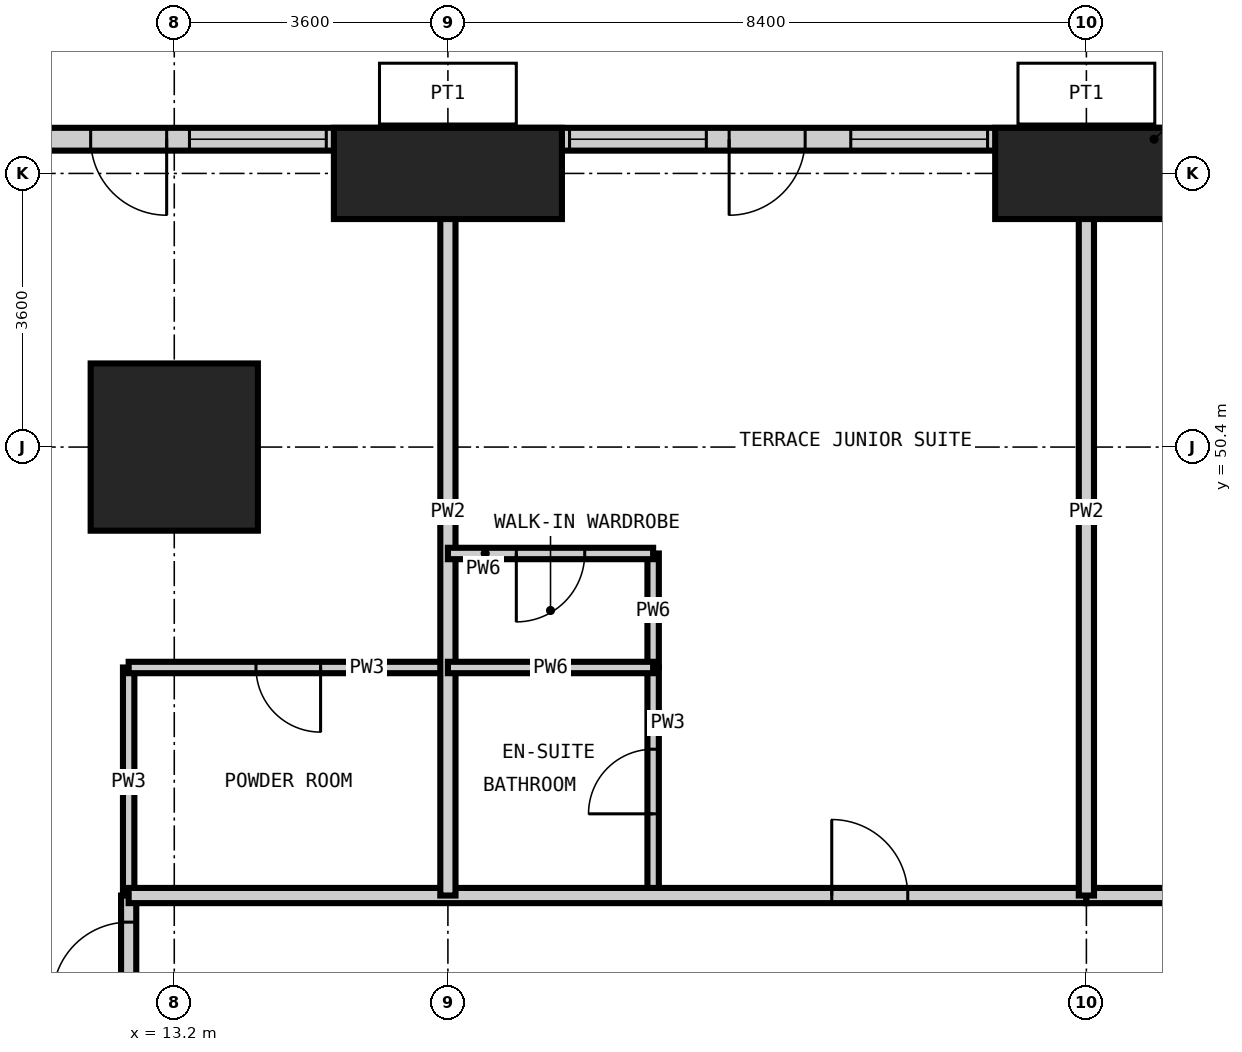
"""IFC4 building model, lengths in metres.
Left out: names, types, materials, properties, quantities, classifications, styles, units other than length and angle.
Written with IfcOpenShell. Run it as: python <this file> out.ifc"""

import sys

from ifc_helpers import new_model, si_unit, direction, frame, frame_2d, origin, origin_2d, place, context, subcontext, project, spatial, rectangle, extrude, element, fill, save


model = new_model("IFC4")
c1 = context("Model", 3, precision=1e-05, world=origin(), true_north=direction((0.0, 1.0)))
c2 = subcontext(c1, "Body", "Model", "MODEL_VIEW")
j1 = project(units=[si_unit("LENGTHUNIT", "METRE"), si_unit("PLANEANGLEUNIT", "RADIAN")], contexts=[c1])
p1 = place(None, origin())
s1 = spatial("IfcSite", under=j1, at=p1, CompositionType="ELEMENT")
p2 = place(p1, origin())
s2 = spatial("IfcBuilding", under=s1, at=p2, CompositionType="ELEMENT")
p3 = place(p2, frame((0.0, 0.0, 93.6)))
s3 = spatial("IfcBuildingStorey", under=s2, at=p3, CompositionType="ELEMENT", Elevation=93.6)
p4 = place(p3, frame((13.2, 50.4, -0.35), z_axis=(0.0, 0.0, 1.0), x_axis=(1.0, 0.0, 0.0)))
e1 = element("IfcColumn", 1, at=p4, inside=s3, PredefinedType="COLUMN", context=c2, shape_type="SweptSolid", body=[
    extrude(rectangle(XDim=2.2, YDim=2.2, at=origin_2d()), origin(), (0.0, 0.0, 1.0), 3.6),
])
p5 = place(p3, frame((16.8, 54.0, -0.35), z_axis=(0.0, 0.0, 1.0), x_axis=(1.0, 0.0, 0.0)))
e2 = element("IfcColumn", 2, at=p5, inside=s3, PredefinedType="COLUMN", context=c2, shape_type="SweptSolid", body=[
    extrude(rectangle(XDim=3.0, YDim=1.2, at=origin_2d()), origin(), (0.0, 0.0, 1.0), 3.6),
])
p6 = place(p3, frame((25.2, 54.0, -0.35), z_axis=(0.0, 0.0, 1.0), x_axis=(1.0, 0.0, 0.0)))
e3 = element("IfcColumn", 3, at=p6, inside=s3, PredefinedType="COLUMN", context=c2, shape_type="SweptSolid", body=[
    extrude(rectangle(XDim=2.4, YDim=1.2, at=origin_2d()), origin(), (0.0, 0.0, 1.0), 3.6),
])
p7 = place(p3, frame((51.9, 54.45, 0.0), z_axis=(0.0, 0.0, 1.0), x_axis=(-1.0, 0.0, 0.0)))
e4 = element("IfcWall", 4, at=p7, inside=s3, PredefinedType="SOLIDWALL", context=c2, shape_type="SweptSolid", body=[
    extrude(rectangle(XDim=49.2, YDim=0.3, at=frame_2d((24.6, 0.0))), origin(), (0.0, 0.0, 1.0), 3.25),
])
p8 = place(p7, frame((45.85, 0.0, 0.0)))
e5 = element("IfcOpeningElement", 5, at=p8, cuts=e4, PredefinedType="OPENING", context=c2, shape_type="SweptSolid", body=[
    extrude(rectangle(XDim=1.0, YDim=2.4, at=frame_2d((0.5, 1.2))), frame((0.0, 0.16, 0.0), z_axis=(0.0, -1.0, 0.0), x_axis=(1.0, 0.0, 0.0)), (0.0, 0.0, 1.0), 0.32),
])
p9 = place(p7, frame((47.1, 0.0, 0.6)))
e6 = element("IfcOpeningElement", 6, at=p9, cuts=e4, PredefinedType="OPENING", context=c2, shape_type="SweptSolid", body=[
    extrude(rectangle(XDim=1.8, YDim=2.1, at=frame_2d((0.9, 1.05))), frame((0.0, 0.16, 0.0), z_axis=(0.0, -1.0, 0.0), x_axis=(1.0, 0.0, 0.0)), (0.0, 0.0, 1.0), 0.32),
])
p10 = place(p7, frame((38.8, 0.0, 0.0)))
e7 = element("IfcOpeningElement", 7, at=p10, cuts=e4, PredefinedType="OPENING", context=c2, shape_type="SweptSolid", body=[
    extrude(rectangle(XDim=1.0, YDim=2.4, at=frame_2d((0.5, 1.2))), frame((0.0, 0.16, 0.0), z_axis=(0.0, -1.0, 0.0), x_axis=(1.0, 0.0, 0.0)), (0.0, 0.0, 1.0), 0.32),
])
p11 = place(p7, frame((40.4, 0.0, 0.6)))
e8 = element("IfcOpeningElement", 8, at=p11, cuts=e4, PredefinedType="OPENING", context=c2, shape_type="SweptSolid", body=[
    extrude(rectangle(XDim=1.8, YDim=2.1, at=frame_2d((0.9, 1.05))), frame((0.0, 0.16, 0.0), z_axis=(0.0, -1.0, 0.0), x_axis=(1.0, 0.0, 0.0)), (0.0, 0.0, 1.0), 0.32),
])
p12 = place(p7, frame((36.7, 0.0, 0.6)))
e9 = element("IfcOpeningElement", 9, at=p12, cuts=e4, PredefinedType="OPENING", context=c2, shape_type="SweptSolid", body=[
    extrude(rectangle(XDim=1.8, YDim=2.1, at=frame_2d((0.9, 1.05))), frame((0.0, 0.16, 0.0), z_axis=(0.0, -1.0, 0.0), x_axis=(1.0, 0.0, 0.0)), (0.0, 0.0, 1.0), 0.32),
])
p13 = place(p7, frame((30.4, 0.0, 0.0)))
e10 = element("IfcOpeningElement", 10, at=p13, cuts=e4, PredefinedType="OPENING", context=c2, shape_type="SweptSolid", body=[
    extrude(rectangle(XDim=1.0, YDim=2.4, at=frame_2d((0.5, 1.2))), frame((0.0, 0.16, 0.0), z_axis=(0.0, -1.0, 0.0), x_axis=(1.0, 0.0, 0.0)), (0.0, 0.0, 1.0), 0.32),
])
p14 = place(p7, frame((31.7, 0.0, 0.6)))
e11 = element("IfcOpeningElement", 11, at=p14, cuts=e4, PredefinedType="OPENING", context=c2, shape_type="SweptSolid", body=[
    extrude(rectangle(XDim=1.8, YDim=2.1, at=frame_2d((0.9, 1.05))), frame((0.0, 0.16, 0.0), z_axis=(0.0, -1.0, 0.0), x_axis=(1.0, 0.0, 0.0)), (0.0, 0.0, 1.0), 0.32),
])
p15 = place(p7, frame((28.0, 0.0, 0.6)))
e12 = element("IfcOpeningElement", 12, at=p15, cuts=e4, PredefinedType="OPENING", context=c2, shape_type="SweptSolid", body=[
    extrude(rectangle(XDim=1.8, YDim=2.1, at=frame_2d((0.9, 1.05))), frame((0.0, 0.16, 0.0), z_axis=(0.0, -1.0, 0.0), x_axis=(1.0, 0.0, 0.0)), (0.0, 0.0, 1.0), 0.32),
])
p16 = place(p7, frame((22.0, 0.0, 0.0)))
e13 = element("IfcOpeningElement", 13, at=p16, cuts=e4, PredefinedType="OPENING", context=c2, shape_type="SweptSolid", body=[
    extrude(rectangle(XDim=1.0, YDim=2.4, at=frame_2d((0.5, 1.2))), frame((0.0, 0.16, 0.0), z_axis=(0.0, -1.0, 0.0), x_axis=(1.0, 0.0, 0.0)), (0.0, 0.0, 1.0), 0.32),
])
p17 = place(p7, frame((23.6, 0.0, 0.6)))
e14 = element("IfcOpeningElement", 14, at=p17, cuts=e4, PredefinedType="OPENING", context=c2, shape_type="SweptSolid", body=[
    extrude(rectangle(XDim=1.8, YDim=2.1, at=frame_2d((0.9, 1.05))), frame((0.0, 0.16, 0.0), z_axis=(0.0, -1.0, 0.0), x_axis=(1.0, 0.0, 0.0)), (0.0, 0.0, 1.0), 0.32),
])
p18 = place(p7, frame((19.6, 0.0, 0.6)))
e15 = element("IfcOpeningElement", 15, at=p18, cuts=e4, PredefinedType="OPENING", context=c2, shape_type="SweptSolid", body=[
    extrude(rectangle(XDim=1.8, YDim=2.1, at=frame_2d((0.9, 1.05))), frame((0.0, 0.16, 0.0), z_axis=(0.0, -1.0, 0.0), x_axis=(1.0, 0.0, 0.0)), (0.0, 0.0, 1.0), 0.32),
])
p19 = place(p7, frame((13.6, 0.0, 0.0)))
e16 = element("IfcOpeningElement", 16, at=p19, cuts=e4, PredefinedType="OPENING", context=c2, shape_type="SweptSolid", body=[
    extrude(rectangle(XDim=1.0, YDim=2.4, at=frame_2d((0.5, 1.2))), frame((0.0, 0.16, 0.0), z_axis=(0.0, -1.0, 0.0), x_axis=(1.0, 0.0, 0.0)), (0.0, 0.0, 1.0), 0.32),
])
p20 = place(p7, frame((15.2, 0.0, 0.6)))
e17 = element("IfcOpeningElement", 17, at=p20, cuts=e4, PredefinedType="OPENING", context=c2, shape_type="SweptSolid", body=[
    extrude(rectangle(XDim=1.8, YDim=2.1, at=frame_2d((0.9, 1.05))), frame((0.0, 0.16, 0.0), z_axis=(0.0, -1.0, 0.0), x_axis=(1.0, 0.0, 0.0)), (0.0, 0.0, 1.0), 0.32),
])
p21 = place(p7, frame((11.5, 0.0, 0.6)))
e18 = element("IfcOpeningElement", 18, at=p21, cuts=e4, PredefinedType="OPENING", context=c2, shape_type="SweptSolid", body=[
    extrude(rectangle(XDim=1.8, YDim=2.1, at=frame_2d((0.9, 1.05))), frame((0.0, 0.16, 0.0), z_axis=(0.0, -1.0, 0.0), x_axis=(1.0, 0.0, 0.0)), (0.0, 0.0, 1.0), 0.32),
])
p22 = place(p7, frame((7.3, 0.0, 0.0)))
e19 = element("IfcOpeningElement", 19, at=p22, cuts=e4, PredefinedType="OPENING", context=c2, shape_type="SweptSolid", body=[
    extrude(rectangle(XDim=1.0, YDim=2.4, at=frame_2d((0.5, 1.2))), frame((0.0, 0.16, 0.0), z_axis=(0.0, -1.0, 0.0), x_axis=(1.0, 0.0, 0.0)), (0.0, 0.0, 1.0), 0.32),
])
p23 = place(p7, frame((2.75, 0.0, 0.0)))
e20 = element("IfcOpeningElement", 20, at=p23, cuts=e4, PredefinedType="OPENING", context=c2, shape_type="SweptSolid", body=[
    extrude(rectangle(XDim=1.0, YDim=2.4, at=frame_2d((0.5, 1.2))), frame((0.0, 0.16, 0.0), z_axis=(0.0, -1.0, 0.0), x_axis=(1.0, 0.0, 0.0)), (0.0, 0.0, 1.0), 0.32),
])
p24 = place(p3, frame((12.6, 44.5, 0.0), z_axis=(0.0, 0.0, 1.0), x_axis=(0.0, 1.0, 0.0)))
e21 = element("IfcWall", 21, at=p24, inside=s3, PredefinedType="PARTITIONING", context=c2, shape_type="SweptSolid", body=[
    extrude(rectangle(XDim=3.0, YDim=0.15, at=frame_2d((1.5, 0.0))), origin(), (0.0, 0.0, 1.0), 3.25),
])
p25 = place(p3, frame((19.5, 44.5, 0.0), z_axis=(0.0, 0.0, 1.0), x_axis=(0.0, 1.0, 0.0)))
e22 = element("IfcWall", 22, at=p25, inside=s3, PredefinedType="PARTITIONING", context=c2, shape_type="SweptSolid", body=[
    extrude(rectangle(XDim=3.0, YDim=0.15, at=frame_2d((1.5, 0.0))), origin(), (0.0, 0.0, 1.0), 3.25),
])
p26 = place(p25, frame((1.075, 0.0, 0.0)))
e23 = element("IfcOpeningElement", 23, at=p26, cuts=e22, PredefinedType="OPENING", context=c2, shape_type="SweptSolid", body=[
    extrude(rectangle(XDim=0.85, YDim=2.1, at=frame_2d((0.425, 1.05))), frame((0.0, 0.085, 0.0), z_axis=(0.0, -1.0, 0.0), x_axis=(1.0, 0.0, 0.0)), (0.0, 0.0, 1.0), 0.17),
])
p27 = place(p3, frame((12.6, 47.5, 0.0), z_axis=(0.0, 0.0, 1.0), x_axis=(1.0, 0.0, 0.0)))
e24 = element("IfcWall", 24, at=p27, inside=s3, PredefinedType="PARTITIONING", context=c2, shape_type="SweptSolid", body=[
    extrude(rectangle(XDim=4.2, YDim=0.15, at=frame_2d((2.1, 0.0))), origin(), (0.0, 0.0, 1.0), 3.25),
])
p28 = place(p27, frame((1.675, 0.0, 0.0)))
e25 = element("IfcOpeningElement", 25, at=p28, cuts=e24, PredefinedType="OPENING", context=c2, shape_type="SweptSolid", body=[
    extrude(rectangle(XDim=0.85, YDim=2.1, at=frame_2d((0.425, 1.05))), frame((0.0, 0.085, 0.0), z_axis=(0.0, -1.0, 0.0), x_axis=(1.0, 0.0, 0.0)), (0.0, 0.0, 1.0), 0.17),
])
p29 = place(p3, frame((12.6, 13.1, 0.0), z_axis=(0.0, 0.0, 1.0), x_axis=(0.0, 1.0, 0.0)))
e26 = element("IfcWall", 26, at=p29, inside=s3, PredefinedType="PARTITIONING", context=c2, shape_type="SweptSolid", body=[
    extrude(rectangle(XDim=31.4, YDim=0.2, at=frame_2d((15.7, 0.0))), origin(), (0.0, 0.0, 1.0), 3.25),
])
p30 = place(p29, frame((6.2, 0.0, 0.0)))
e27 = element("IfcOpeningElement", 27, at=p30, cuts=e26, PredefinedType="OPENING", context=c2, shape_type="SweptSolid", body=[
    extrude(rectangle(XDim=1.0, YDim=2.2, at=frame_2d((0.5, 1.1))), frame((0.0, 0.11, 0.0), z_axis=(0.0, -1.0, 0.0), x_axis=(1.0, 0.0, 0.0)), (0.0, 0.0, 1.0), 0.22),
])
p31 = place(p29, frame((17.0, 0.0, 0.0)))
e28 = element("IfcOpeningElement", 28, at=p31, cuts=e26, PredefinedType="OPENING", context=c2, shape_type="SweptSolid", body=[
    extrude(rectangle(XDim=1.0, YDim=2.2, at=frame_2d((0.5, 1.1))), frame((0.0, 0.11, 0.0), z_axis=(0.0, -1.0, 0.0), x_axis=(1.0, 0.0, 0.0)), (0.0, 0.0, 1.0), 0.22),
])
p32 = place(p29, frame((23.0, 0.0, 0.0)))
e29 = element("IfcOpeningElement", 29, at=p32, cuts=e26, PredefinedType="OPENING", context=c2, shape_type="SweptSolid", body=[
    extrude(rectangle(XDim=1.0, YDim=2.2, at=frame_2d((0.5, 1.1))), frame((0.0, 0.11, 0.0), z_axis=(0.0, -1.0, 0.0), x_axis=(1.0, 0.0, 0.0)), (0.0, 0.0, 1.0), 0.22),
])
p33 = place(p29, frame((1.35, 0.0, 0.0)))
e30 = element("IfcOpeningElement", 30, at=p33, cuts=e26, PredefinedType="OPENING", context=c2, shape_type="SweptSolid", body=[
    extrude(rectangle(XDim=1.0, YDim=2.2, at=frame_2d((0.5, 1.1))), frame((0.0, 0.11, 0.0), z_axis=(0.0, -1.0, 0.0), x_axis=(1.0, 0.0, 0.0)), (0.0, 0.0, 1.0), 0.22),
])
p34 = place(p29, frame((30.05, 0.0, 0.0)))
e31 = element("IfcOpeningElement", 31, at=p34, cuts=e26, PredefinedType="OPENING", context=c2, shape_type="SweptSolid", body=[
    extrude(rectangle(XDim=1.0, YDim=2.2, at=frame_2d((0.5, 1.1))), frame((0.0, 0.11, 0.0), z_axis=(0.0, -1.0, 0.0), x_axis=(1.0, 0.0, 0.0)), (0.0, 0.0, 1.0), 0.22),
])
p35 = place(p3, frame((12.6, 44.5, 0.0), z_axis=(0.0, 0.0, 1.0), x_axis=(1.0, 0.0, 0.0)))
e32 = element("IfcWall", 32, at=p35, inside=s3, PredefinedType="PARTITIONING", context=c2, shape_type="SweptSolid", body=[
    extrude(rectangle(XDim=12.6, YDim=0.2, at=frame_2d((6.3, 0.0))), origin(), (0.0, 0.0, 1.0), 3.25),
])
p36 = place(p35, frame((9.25, 0.0, 0.0)))
e33 = element("IfcOpeningElement", 33, at=p36, cuts=e32, PredefinedType="OPENING", context=c2, shape_type="SweptSolid", body=[
    extrude(rectangle(XDim=1.0, YDim=2.2, at=frame_2d((0.5, 1.1))), frame((0.0, 0.11, 0.0), z_axis=(0.0, -1.0, 0.0), x_axis=(1.0, 0.0, 0.0)), (0.0, 0.0, 1.0), 0.22),
])
p37 = place(p3, frame((33.6, 44.5, 0.0), z_axis=(0.0, 0.0, 1.0), x_axis=(-1.0, 0.0, 0.0)))
e34 = element("IfcWall", 34, at=p37, inside=s3, PredefinedType="PARTITIONING", context=c2, shape_type="SweptSolid", body=[
    extrude(rectangle(XDim=8.4, YDim=0.2, at=frame_2d((4.2, 0.0))), origin(), (0.0, 0.0, 1.0), 3.25),
])
p38 = place(p37, frame((3.3, 0.0, 0.0)))
e35 = element("IfcOpeningElement", 35, at=p38, cuts=e34, PredefinedType="OPENING", context=c2, shape_type="SweptSolid", body=[
    extrude(rectangle(XDim=1.8, YDim=2.4, at=frame_2d((0.9, 1.2))), frame((0.0, 0.11, 0.0), z_axis=(0.0, -1.0, 0.0), x_axis=(1.0, 0.0, 0.0)), (0.0, 0.0, 1.0), 0.22),
])
for number, where, z_axis, x_axis in (
    (36, (16.8, 44.5, 0.0), (0.0, 0.0, 1.0), (0.0, 1.0, 0.0)),
    (37, (25.2, 44.5, 0.0), (0.0, 0.0, 1.0), (0.0, 1.0, 0.0)),
):
    element("IfcWall", number, at=place(p3, frame(where, z_axis=z_axis, x_axis=x_axis)), inside=s3, PredefinedType="PARTITIONING", context=c2, shape_type="SweptSolid", body=[
        extrude(rectangle(XDim=10.1, YDim=0.2, at=frame_2d((5.05, 0.0))), origin(), (0.0, 0.0, 1.0), 3.25),
    ])
p39 = place(p3, frame((19.5, 47.5, 0.0), z_axis=(0.0, 0.0, 1.0), x_axis=(0.0, 1.0, 0.0)))
e38 = element("IfcWall", 38, at=p39, inside=s3, PredefinedType="PARTITIONING", context=c2, shape_type="SweptSolid", body=[
    extrude(rectangle(XDim=1.5, YDim=0.15, at=frame_2d((0.75, 0.0))), origin(), (0.0, 0.0, 1.0), 3.25),
])
p40 = place(p3, frame((16.8, 47.5, 0.0), z_axis=(0.0, 0.0, 1.0), x_axis=(1.0, 0.0, 0.0)))
e39 = element("IfcWall", 39, at=p40, inside=s3, PredefinedType="PARTITIONING", context=c2, shape_type="SweptSolid", body=[
    extrude(rectangle(XDim=2.7, YDim=0.15, at=frame_2d((1.35, 0.0))), origin(), (0.0, 0.0, 1.0), 3.25),
])
p41 = place(p3, frame((16.8, 49.0, 0.0), z_axis=(0.0, 0.0, 1.0), x_axis=(1.0, 0.0, 0.0)))
e40 = element("IfcWall", 40, at=p41, inside=s3, PredefinedType="PARTITIONING", context=c2, shape_type="SweptSolid", body=[
    extrude(rectangle(XDim=2.7, YDim=0.15, at=frame_2d((1.35, 0.0))), origin(), (0.0, 0.0, 1.0), 3.25),
])
p42 = place(p41, frame((0.9, 0.0, 0.0)))
e41 = element("IfcOpeningElement", 41, at=p42, cuts=e40, PredefinedType="OPENING", context=c2, shape_type="SweptSolid", body=[
    extrude(rectangle(XDim=0.9, YDim=2.1, at=frame_2d((0.45, 1.05))), frame((0.0, 0.085, 0.0), z_axis=(0.0, -1.0, 0.0), x_axis=(1.0, 0.0, 0.0)), (0.0, 0.0, 1.0), 0.17),
])
p43 = place(p10, origin())
e42 = element("IfcDoor", 42, at=p43, inside=s3, OperationType="SINGLE_SWING_LEFT", PredefinedType="DOOR", context=c2, shape_type="SweptSolid", body=[
    extrude(rectangle(XDim=1.0, YDim=2.4, at=frame_2d((0.5, 1.2))), frame((0.0, 0.025, 0.0), z_axis=(0.0, -1.0, 0.0), x_axis=(1.0, 0.0, 0.0)), (0.0, 0.0, 1.0), 0.05),
])
fill(e7, e42)
p44 = place(p12, origin())
e43 = element("IfcWindow", 43, at=p44, inside=s3, PartitioningType="SINGLE_PANEL", PredefinedType="WINDOW", context=c2, shape_type="SweptSolid", body=[
    extrude(rectangle(XDim=1.8, YDim=2.1, at=frame_2d((0.9, 1.05))), frame((0.0, 0.03, 0.0), z_axis=(0.0, -1.0, 0.0), x_axis=(1.0, 0.0, 0.0)), (0.0, 0.0, 1.0), 0.06),
])
fill(e9, e43)
p45 = place(p13, origin())
e44 = element("IfcDoor", 44, at=p45, inside=s3, OperationType="SINGLE_SWING_RIGHT", PredefinedType="DOOR", context=c2, shape_type="SweptSolid", body=[
    extrude(rectangle(XDim=1.0, YDim=2.4, at=frame_2d((0.5, 1.2))), frame((0.0, 0.025, 0.0), z_axis=(0.0, -1.0, 0.0), x_axis=(1.0, 0.0, 0.0)), (0.0, 0.0, 1.0), 0.05),
])
fill(e10, e44)
p46 = place(p14, origin())
e45 = element("IfcWindow", 45, at=p46, inside=s3, PartitioningType="SINGLE_PANEL", PredefinedType="WINDOW", context=c2, shape_type="SweptSolid", body=[
    extrude(rectangle(XDim=1.8, YDim=2.1, at=frame_2d((0.9, 1.05))), frame((0.0, 0.03, 0.0), z_axis=(0.0, -1.0, 0.0), x_axis=(1.0, 0.0, 0.0)), (0.0, 0.0, 1.0), 0.06),
])
fill(e11, e45)
p47 = place(p15, origin())
e46 = element("IfcWindow", 46, at=p47, inside=s3, PartitioningType="SINGLE_PANEL", PredefinedType="WINDOW", context=c2, shape_type="SweptSolid", body=[
    extrude(rectangle(XDim=1.8, YDim=2.1, at=frame_2d((0.9, 1.05))), frame((0.0, 0.03, 0.0), z_axis=(0.0, -1.0, 0.0), x_axis=(1.0, 0.0, 0.0)), (0.0, 0.0, 1.0), 0.06),
])
fill(e12, e46)
p48 = place(p36, origin())
e47 = element("IfcDoor", 47, at=p48, inside=s3, OperationType="SINGLE_SWING_LEFT", PredefinedType="DOOR", context=c2, shape_type="SweptSolid", body=[
    extrude(rectangle(XDim=1.0, YDim=2.2, at=frame_2d((0.5, 1.1))), frame((0.0, 0.025, 0.0), z_axis=(0.0, -1.0, 0.0), x_axis=(1.0, 0.0, 0.0)), (0.0, 0.0, 1.0), 0.05),
])
fill(e33, e47)
p49 = place(p26, origin())
e48 = element("IfcDoor", 48, at=p49, inside=s3, OperationType="SINGLE_SWING_LEFT", PredefinedType="DOOR", context=c2, shape_type="SweptSolid", body=[
    extrude(rectangle(XDim=0.85, YDim=2.1, at=frame_2d((0.425, 1.05))), frame((0.0, 0.025, 0.0), z_axis=(0.0, -1.0, 0.0), x_axis=(1.0, 0.0, 0.0)), (0.0, 0.0, 1.0), 0.05),
])
fill(e23, e48)
p50 = place(p42, frame((0.9, 0.0, 0.0), z_axis=(0.0, 0.0, 1.0), x_axis=(-1.0, 0.0, 0.0)))
e49 = element("IfcDoor", 49, at=p50, inside=s3, OperationType="SINGLE_SWING_RIGHT", PredefinedType="DOOR", context=c2, shape_type="SweptSolid", body=[
    extrude(rectangle(XDim=0.9, YDim=2.1, at=frame_2d((0.45, 1.05))), frame((0.0, 0.025, 0.0), z_axis=(0.0, -1.0, 0.0), x_axis=(1.0, 0.0, 0.0)), (0.0, 0.0, 1.0), 0.05),
])
fill(e41, e49)
p51 = place(p34, origin())
e50 = element("IfcDoor", 50, at=p51, inside=s3, OperationType="SINGLE_SWING_LEFT", PredefinedType="DOOR", context=c2, shape_type="SweptSolid", body=[
    extrude(rectangle(XDim=1.0, YDim=2.2, at=frame_2d((0.5, 1.1))), frame((0.0, 0.025, 0.0), z_axis=(0.0, -1.0, 0.0), x_axis=(1.0, 0.0, 0.0)), (0.0, 0.0, 1.0), 0.05),
])
fill(e31, e50)
p52 = place(p28, frame((0.85, 0.0, 0.0), z_axis=(0.0, 0.0, 1.0), x_axis=(-1.0, 0.0, 0.0)))
e51 = element("IfcDoor", 51, at=p52, inside=s3, OperationType="SINGLE_SWING_LEFT", PredefinedType="DOOR", context=c2, shape_type="SweptSolid", body=[
    extrude(rectangle(XDim=0.85, YDim=2.1, at=frame_2d((0.425, 1.05))), frame((0.0, 0.025, 0.0), z_axis=(0.0, -1.0, 0.0), x_axis=(1.0, 0.0, 0.0)), (0.0, 0.0, 1.0), 0.05),
])
fill(e25, e51)
save(model, sys.argv[1])
